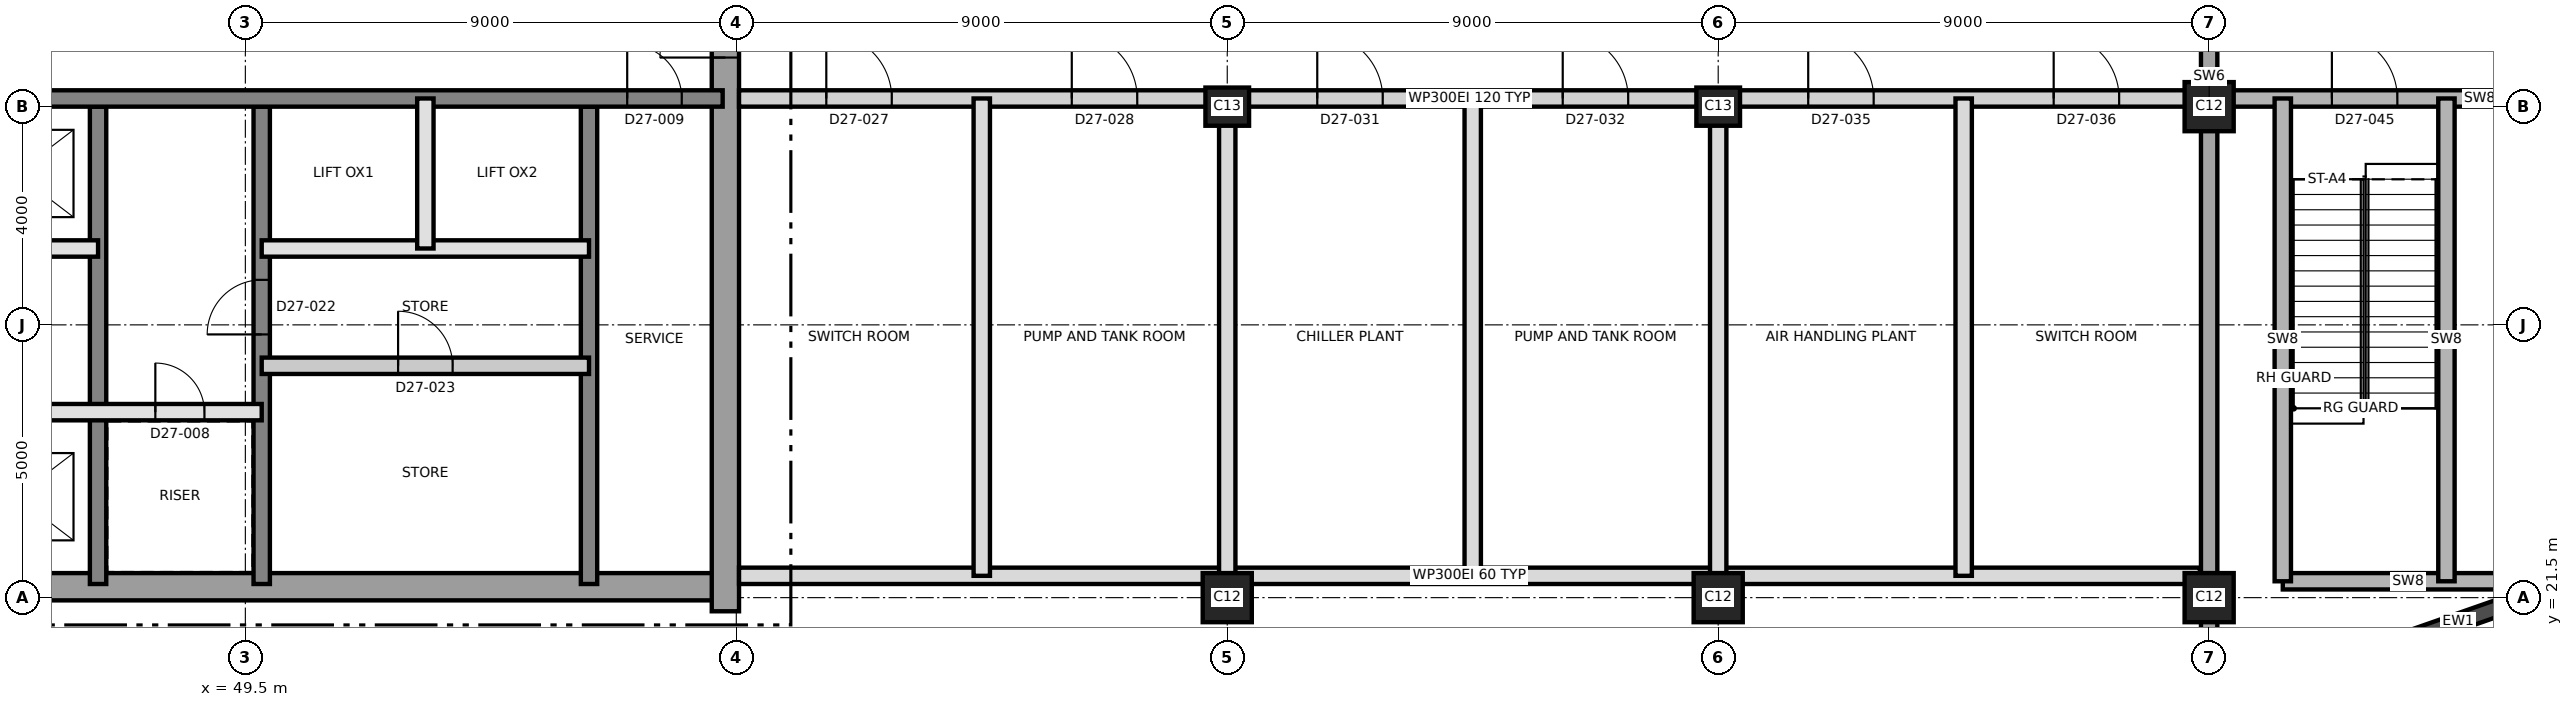
"""IFC4 building model, lengths in metres.
Left out: names, types, materials, properties, quantities, classifications, styles, units other than length and angle.
Written with IfcOpenShell. Run it as: python <this file> out.ifc"""

import sys

from ifc_helpers import new_model, si_unit, direction, frame, frame_2d, origin, origin_2d, place, context, subcontext, project, spatial, rectangle, extrude, element, fill, save


model = new_model("IFC4")
c1 = context("Model", 3, precision=1e-05, world=origin(), true_north=direction((0.0, 1.0)))
c2 = subcontext(c1, "Body", "Model", "MODEL_VIEW")
j1 = project(units=[si_unit("LENGTHUNIT", "METRE"), si_unit("PLANEANGLEUNIT", "RADIAN")], contexts=[c1])
p1 = place(None, origin())
s1 = spatial("IfcSite", under=j1, at=p1, CompositionType="ELEMENT")
p2 = place(p1, origin())
s2 = spatial("IfcBuilding", under=s1, at=p2, CompositionType="ELEMENT")
p3 = place(p2, frame((0.0, 0.0, 243.9)))
s3 = spatial("IfcBuildingStorey", under=s2, at=p3, CompositionType="ELEMENT", Elevation=243.9)
p4 = place(p3, frame((31.25, 21.7, 0.0), z_axis=(0.0, 0.0, 1.0), x_axis=(1.0, 0.0, 0.0)))
e1 = element("IfcWall", 1, at=p4, inside=s3, PredefinedType="SHEAR", context=c2, shape_type="SweptSolid", body=[
    extrude(rectangle(XDim=27.0, YDim=0.5, at=frame_2d((13.5, 0.0))), origin(), (0.0, 0.0, 1.0), 5.5),
])
p5 = place(p3, frame((58.3, 21.25, 0.0), z_axis=(0.0, 0.0, 1.0), x_axis=(0.0, 1.0, 0.0)))
e2 = element("IfcWall", 2, at=p5, inside=s3, PredefinedType="SHEAR", context=c2, shape_type="SweptSolid", body=[
    extrude(rectangle(XDim=18.5, YDim=0.5, at=frame_2d((9.25, 0.0))), origin(), (0.0, 0.0, 1.0), 5.5),
])
p6 = place(p5, frame((10.15, 0.0, 0.0)))
e3 = element("IfcOpeningElement", 3, at=p6, cuts=e2, PredefinedType="OPENING", context=c2, shape_type="SweptSolid", body=[
    extrude(rectangle(XDim=1.2, YDim=2.1, at=frame_2d((0.6, 1.05))), frame((0.0, 0.26, 0.0), z_axis=(0.0, -1.0, 0.0), x_axis=(1.0, 0.0, 0.0)), (0.0, 0.0, 1.0), 0.52),
])
p7 = place(p3, frame((46.8, 21.75, 0.0), z_axis=(0.0, 0.0, 1.0), x_axis=(0.0, 1.0, 0.0)))
e4 = element("IfcWall", 4, at=p7, inside=s3, PredefinedType="SHEAR", context=c2, shape_type="SweptSolid", body=[
    extrude(rectangle(XDim=8.75, YDim=0.3, at=frame_2d((4.375, 0.0))), origin(), (0.0, 0.0, 1.0), 5.5),
])
p8 = place(p3, frame((49.8, 21.75, 0.0), z_axis=(0.0, 0.0, 1.0), x_axis=(0.0, 1.0, 0.0)))
e5 = element("IfcWall", 5, at=p8, inside=s3, PredefinedType="SHEAR", context=c2, shape_type="SweptSolid", body=[
    extrude(rectangle(XDim=8.75, YDim=0.3, at=frame_2d((4.375, 0.0))), origin(), (0.0, 0.0, 1.0), 5.5),
])
p9 = place(p8, frame((4.575, 0.0, 0.0)))
e6 = element("IfcOpeningElement", 6, at=p9, cuts=e5, PredefinedType="OPENING", context=c2, shape_type="SweptSolid", body=[
    extrude(rectangle(XDim=1.0, YDim=2.1, at=frame_2d((0.5, 1.05))), frame((0.0, 0.16, 0.0), z_axis=(0.0, -1.0, 0.0), x_axis=(1.0, 0.0, 0.0)), (0.0, 0.0, 1.0), 0.32),
])
p10 = place(p3, frame((55.8, 21.75, 0.0), z_axis=(0.0, 0.0, 1.0), x_axis=(0.0, 1.0, 0.0)))
e7 = element("IfcWall", 7, at=p10, inside=s3, PredefinedType="SHEAR", context=c2, shape_type="SweptSolid", body=[
    extrude(rectangle(XDim=8.75, YDim=0.3, at=frame_2d((4.375, 0.0))), origin(), (0.0, 0.0, 1.0), 5.5),
])
p11 = place(p3, frame((31.75, 30.65, 0.0), z_axis=(0.0, 0.0, 1.0), x_axis=(1.0, 0.0, 0.0)))
e8 = element("IfcWall", 8, at=p11, inside=s3, PredefinedType="SHEAR", context=c2, shape_type="SweptSolid", body=[
    extrude(rectangle(XDim=26.5, YDim=0.3, at=frame_2d((13.25, 0.0))), origin(), (0.0, 0.0, 1.0), 5.5),
])
p12 = place(p11, frame((24.75, 0.0, 0.0)))
e9 = element("IfcOpeningElement", 9, at=p12, cuts=e8, PredefinedType="OPENING", context=c2, shape_type="SweptSolid", body=[
    extrude(rectangle(XDim=1.0, YDim=2.1, at=frame_2d((0.5, 1.05))), frame((0.0, 0.16, 0.0), z_axis=(0.0, -1.0, 0.0), x_axis=(1.0, 0.0, 0.0)), (0.0, 0.0, 1.0), 0.32),
])
for number, where, z_axis, x_axis in (
    (10, (67.5, 21.5, 0.0), (0.0, 0.0, 1.0), (1.0, 0.0, 0.0)),
    (11, (76.5, 21.5, 0.0), (0.0, 0.0, 1.0), (1.0, 0.0, 0.0)),
    (12, (85.5, 21.5, 0.0), (0.0, 0.0, 1.0), (1.0, 0.0, 0.0)),
):
    element("IfcColumn", number, at=place(p3, frame(where, z_axis=z_axis, x_axis=x_axis)), inside=s3, PredefinedType="COLUMN", context=c2, shape_type="SweptSolid", body=[
        extrude(rectangle(XDim=0.9, YDim=0.9, at=origin_2d()), origin(), (0.0, 0.0, 1.0), 5.5),
    ])
for number, where, z_axis, x_axis in (
    (13, (67.5, 30.5, 0.0), (0.0, 0.0, 1.0), (1.0, 0.0, 0.0)),
    (14, (76.5, 30.5, 0.0), (0.0, 0.0, 1.0), (1.0, 0.0, 0.0)),
):
    element("IfcColumn", number, at=place(p3, frame(where, z_axis=z_axis, x_axis=x_axis)), inside=s3, PredefinedType="COLUMN", context=c2, shape_type="SweptSolid", body=[
        extrude(rectangle(XDim=0.8, YDim=0.7, at=origin_2d()), origin(), (0.0, 0.0, 1.0), 5.5),
    ])
p13 = place(p3, frame((85.5, 30.5, 0.0), z_axis=(0.0, 0.0, 1.0), x_axis=(1.0, 0.0, 0.0)))
e15 = element("IfcColumn", 15, at=p13, inside=s3, PredefinedType="COLUMN", context=c2, shape_type="SweptSolid", body=[
    extrude(rectangle(XDim=0.9, YDim=0.9, at=origin_2d()), origin(), (0.0, 0.0, 1.0), 5.5),
])
p14 = place(p3, frame((85.5, 20.35, 0.0), z_axis=(0.0, 0.0, 1.0), x_axis=(0.0, 1.0, 0.0)))
e16 = element("IfcWall", 16, at=p14, inside=s3, PredefinedType="SHEAR", context=c2, shape_type="SweptSolid", body=[
    extrude(rectangle(XDim=20.3, YDim=0.3, at=frame_2d((10.15, 0.0))), origin(), (0.0, 0.0, 1.0), 5.5),
])
p15 = place(p14, frame((11.35, 0.0, 0.0)))
e17 = element("IfcOpeningElement", 17, at=p15, cuts=e16, PredefinedType="OPENING", context=c2, shape_type="SweptSolid", body=[
    extrude(rectangle(XDim=1.4, YDim=2.1, at=frame_2d((0.7, 1.05))), frame((0.0, 0.16, 0.0), z_axis=(0.0, -1.0, 0.0), x_axis=(1.0, 0.0, 0.0)), (0.0, 0.0, 1.0), 0.32),
])
p16 = place(p3, frame((87.499, 20.158, 0.0), z_axis=(0.0, 0.0, 1.0), x_axis=(0.943879346284, 0.330290447423, 0.0)))
e18 = element("IfcWall", 18, at=p16, inside=s3, PredefinedType="SOLIDWALL", context=c2, shape_type="SweptSolid", body=[
    extrude(rectangle(XDim=5.439, YDim=0.3, at=frame_2d((2.72, 0.0))), origin(), (0.0, 0.0, 1.0), 5.2),
])
p17 = place(p3, frame((37.8, 24.9, 0.0), z_axis=(0.0, 0.0, 1.0), x_axis=(1.0, 0.0, 0.0)))
e19 = element("IfcWall", 19, at=p17, inside=s3, PredefinedType="SOLIDWALL", context=c2, shape_type="SweptSolid", body=[
    extrude(rectangle(XDim=12.0, YDim=0.3, at=frame_2d((6.0, 0.0))), origin(), (0.0, 0.0, 1.0), 5.2),
])
p18 = place(p17, frame((1.05, 0.0, 0.0)))
e20 = element("IfcOpeningElement", 20, at=p18, cuts=e19, PredefinedType="OPENING", context=c2, shape_type="SweptSolid", body=[
    extrude(rectangle(XDim=0.9, YDim=2.1, at=frame_2d((0.45, 1.05))), frame((0.0, 0.16, 0.0), z_axis=(0.0, -1.0, 0.0), x_axis=(1.0, 0.0, 0.0)), (0.0, 0.0, 1.0), 0.32),
])
p19 = place(p17, frame((10.05, 0.0, 0.0)))
e21 = element("IfcOpeningElement", 21, at=p19, cuts=e19, PredefinedType="OPENING", context=c2, shape_type="SweptSolid", body=[
    extrude(rectangle(XDim=0.9, YDim=2.1, at=frame_2d((0.45, 1.05))), frame((0.0, 0.16, 0.0), z_axis=(0.0, -1.0, 0.0), x_axis=(1.0, 0.0, 0.0)), (0.0, 0.0, 1.0), 0.32),
])
p20 = place(p17, frame((3.95, 0.0, 0.0)))
e22 = element("IfcOpeningElement", 22, at=p20, cuts=e19, PredefinedType="OPENING", context=c2, shape_type="SweptSolid", body=[
    extrude(rectangle(XDim=1.1, YDim=2.4, at=frame_2d((0.55, 1.2))), frame((0.0, 0.16, 0.0), z_axis=(0.0, -1.0, 0.0), x_axis=(1.0, 0.0, 0.0)), (0.0, 0.0, 1.0), 0.32),
])
p21 = place(p17, frame((6.95, 0.0, 0.0)))
e23 = element("IfcOpeningElement", 23, at=p21, cuts=e19, PredefinedType="OPENING", context=c2, shape_type="SweptSolid", body=[
    extrude(rectangle(XDim=1.1, YDim=2.4, at=frame_2d((0.55, 1.2))), frame((0.0, 0.16, 0.0), z_axis=(0.0, -1.0, 0.0), x_axis=(1.0, 0.0, 0.0)), (0.0, 0.0, 1.0), 0.32),
])
p22 = place(p3, frame((49.8, 25.75, 0.0), z_axis=(0.0, 0.0, 1.0), x_axis=(1.0, 0.0, 0.0)))
e24 = element("IfcWall", 24, at=p22, inside=s3, PredefinedType="PARTITIONING", context=c2, shape_type="SweptSolid", body=[
    extrude(rectangle(XDim=6.0, YDim=0.3, at=frame_2d((3.0, 0.0))), origin(), (0.0, 0.0, 1.0), 5.2),
])
p23 = place(p22, frame((2.5, 0.0, 0.0)))
e25 = element("IfcOpeningElement", 25, at=p23, cuts=e24, PredefinedType="OPENING", context=c2, shape_type="SweptSolid", body=[
    extrude(rectangle(XDim=1.0, YDim=2.1, at=frame_2d((0.5, 1.05))), frame((0.0, 0.16, 0.0), z_axis=(0.0, -1.0, 0.0), x_axis=(1.0, 0.0, 0.0)), (0.0, 0.0, 1.0), 0.32),
])
p24 = place(p3, frame((40.8, 27.9, 0.0), z_axis=(0.0, 0.0, 1.0), x_axis=(1.0, 0.0, 0.0)))
e26 = element("IfcWall", 26, at=p24, inside=s3, PredefinedType="SOLIDWALL", context=c2, shape_type="SweptSolid", body=[
    extrude(rectangle(XDim=6.0, YDim=0.3, at=frame_2d((3.0, 0.0))), origin(), (0.0, 0.0, 1.0), 5.2),
])
p25 = place(p24, frame((0.95, 0.0, 0.0)))
e27 = element("IfcOpeningElement", 27, at=p25, cuts=e26, PredefinedType="OPENING", context=c2, shape_type="SweptSolid", body=[
    extrude(rectangle(XDim=1.1, YDim=2.4, at=frame_2d((0.55, 1.2))), frame((0.0, 0.16, 0.0), z_axis=(0.0, -1.0, 0.0), x_axis=(1.0, 0.0, 0.0)), (0.0, 0.0, 1.0), 0.32),
])
p26 = place(p24, frame((3.95, 0.0, 0.0)))
e28 = element("IfcOpeningElement", 28, at=p26, cuts=e26, PredefinedType="OPENING", context=c2, shape_type="SweptSolid", body=[
    extrude(rectangle(XDim=1.1, YDim=2.4, at=frame_2d((0.55, 1.2))), frame((0.0, 0.16, 0.0), z_axis=(0.0, -1.0, 0.0), x_axis=(1.0, 0.0, 0.0)), (0.0, 0.0, 1.0), 0.32),
])
p27 = place(p3, frame((49.8, 27.9, 0.0), z_axis=(0.0, 0.0, 1.0), x_axis=(1.0, 0.0, 0.0)))
e29 = element("IfcWall", 29, at=p27, inside=s3, PredefinedType="SOLIDWALL", context=c2, shape_type="SweptSolid", body=[
    extrude(rectangle(XDim=6.0, YDim=0.3, at=frame_2d((3.0, 0.0))), origin(), (0.0, 0.0, 1.0), 5.2),
])
p28 = place(p3, frame((52.8, 27.9, 0.0), z_axis=(0.0, 0.0, 1.0), x_axis=(0.0, 1.0, 0.0)))
e30 = element("IfcWall", 30, at=p28, inside=s3, PredefinedType="SOLIDWALL", context=c2, shape_type="SweptSolid", body=[
    extrude(rectangle(XDim=2.75, YDim=0.3, at=frame_2d((1.375, 0.0))), origin(), (0.0, 0.0, 1.0), 5.2),
])
p29 = place(p3, frame((86.85, 21.8, 0.0), z_axis=(0.0, 0.0, 1.0), x_axis=(1.0, 0.0, 0.0)))
e31 = element("IfcWall", 31, at=p29, inside=s3, PredefinedType="SHEAR", context=c2, shape_type="SweptSolid", body=[
    extrude(rectangle(XDim=4.596, YDim=0.3, at=frame_2d((2.298, 0.0))), origin(), (0.0, 0.0, 1.0), 5.2),
])
p30 = place(p3, frame((58.55, 21.9, 0.0), z_axis=(0.0, 0.0, 1.0), x_axis=(1.0, 0.0, 0.0)))
e32 = element("IfcWall", 32, at=p30, inside=s3, PredefinedType="PARTITIONING", context=c2, shape_type="SweptSolid", body=[
    extrude(rectangle(XDim=26.78, YDim=0.3, at=frame_2d((13.39, 0.0))), origin(), (0.0, 0.0, 1.0), 5.2),
])
p31 = place(p3, frame((58.55, 30.65, 0.0), z_axis=(0.0, 0.0, 1.0), x_axis=(1.0, 0.0, 0.0)))
e33 = element("IfcWall", 33, at=p31, inside=s3, PredefinedType="PARTITIONING", context=c2, shape_type="SweptSolid", body=[
    extrude(rectangle(XDim=26.78, YDim=0.3, at=frame_2d((13.39, 0.0))), origin(), (0.0, 0.0, 1.0), 5.2),
])
p32 = place(p31, frame((1.6, 0.0, 0.0)))
e34 = element("IfcOpeningElement", 34, at=p32, cuts=e33, PredefinedType="OPENING", context=c2, shape_type="SweptSolid", body=[
    extrude(rectangle(XDim=1.2, YDim=2.1, at=frame_2d((0.6, 1.05))), frame((0.0, 0.16, 0.0), z_axis=(0.0, -1.0, 0.0), x_axis=(1.0, 0.0, 0.0)), (0.0, 0.0, 1.0), 0.32),
])
p33 = place(p31, frame((6.1, 0.0, 0.0)))
e35 = element("IfcOpeningElement", 35, at=p33, cuts=e33, PredefinedType="OPENING", context=c2, shape_type="SweptSolid", body=[
    extrude(rectangle(XDim=1.2, YDim=2.1, at=frame_2d((0.6, 1.05))), frame((0.0, 0.16, 0.0), z_axis=(0.0, -1.0, 0.0), x_axis=(1.0, 0.0, 0.0)), (0.0, 0.0, 1.0), 0.32),
])
p34 = place(p31, frame((10.6, 0.0, 0.0)))
e36 = element("IfcOpeningElement", 36, at=p34, cuts=e33, PredefinedType="OPENING", context=c2, shape_type="SweptSolid", body=[
    extrude(rectangle(XDim=1.2, YDim=2.1, at=frame_2d((0.6, 1.05))), frame((0.0, 0.16, 0.0), z_axis=(0.0, -1.0, 0.0), x_axis=(1.0, 0.0, 0.0)), (0.0, 0.0, 1.0), 0.32),
])
p35 = place(p31, frame((15.1, 0.0, 0.0)))
e37 = element("IfcOpeningElement", 37, at=p35, cuts=e33, PredefinedType="OPENING", context=c2, shape_type="SweptSolid", body=[
    extrude(rectangle(XDim=1.2, YDim=2.1, at=frame_2d((0.6, 1.05))), frame((0.0, 0.16, 0.0), z_axis=(0.0, -1.0, 0.0), x_axis=(1.0, 0.0, 0.0)), (0.0, 0.0, 1.0), 0.32),
])
p36 = place(p31, frame((19.6, 0.0, 0.0)))
e38 = element("IfcOpeningElement", 38, at=p36, cuts=e33, PredefinedType="OPENING", context=c2, shape_type="SweptSolid", body=[
    extrude(rectangle(XDim=1.2, YDim=2.1, at=frame_2d((0.6, 1.05))), frame((0.0, 0.16, 0.0), z_axis=(0.0, -1.0, 0.0), x_axis=(1.0, 0.0, 0.0)), (0.0, 0.0, 1.0), 0.32),
])
p37 = place(p31, frame((24.1, 0.0, 0.0)))
e39 = element("IfcOpeningElement", 39, at=p37, cuts=e33, PredefinedType="OPENING", context=c2, shape_type="SweptSolid", body=[
    extrude(rectangle(XDim=1.2, YDim=2.1, at=frame_2d((0.6, 1.05))), frame((0.0, 0.16, 0.0), z_axis=(0.0, -1.0, 0.0), x_axis=(1.0, 0.0, 0.0)), (0.0, 0.0, 1.0), 0.32),
])
p38 = place(p3, frame((85.67, 30.65, 0.0), z_axis=(0.0, 0.0, 1.0), x_axis=(1.0, 0.0, 0.0)))
e40 = element("IfcWall", 40, at=p38, inside=s3, PredefinedType="SHEAR", context=c2, shape_type="SweptSolid", body=[
    extrude(rectangle(XDim=9.58, YDim=0.3, at=frame_2d((4.79, 0.0))), origin(), (0.0, 0.0, 1.0), 5.2),
])
p39 = place(p38, frame((2.08, 0.0, 0.0)))
e41 = element("IfcOpeningElement", 41, at=p39, cuts=e40, PredefinedType="OPENING", context=c2, shape_type="SweptSolid", body=[
    extrude(rectangle(XDim=1.2, YDim=2.1, at=frame_2d((0.6, 1.05))), frame((0.0, 0.16, 0.0), z_axis=(0.0, -1.0, 0.0), x_axis=(1.0, 0.0, 0.0)), (0.0, 0.0, 1.0), 0.32),
])
p40 = place(p38, frame((5.63, 0.0, 0.0)))
e42 = element("IfcOpeningElement", 42, at=p40, cuts=e40, PredefinedType="OPENING", context=c2, shape_type="SweptSolid", body=[
    extrude(rectangle(XDim=1.0, YDim=2.1, at=frame_2d((0.5, 1.05))), frame((0.0, 0.16, 0.0), z_axis=(0.0, -1.0, 0.0), x_axis=(1.0, 0.0, 0.0)), (0.0, 0.0, 1.0), 0.32),
])
for number, where, z_axis, x_axis in (
    (43, (63.0, 21.9, 0.0), (0.0, 0.0, 1.0), (0.0, 1.0, 0.0)),
    (44, (67.5, 21.9, 0.0), (0.0, 0.0, 1.0), (0.0, 1.0, 0.0)),
    (45, (72.0, 21.9, 0.0), (0.0, 0.0, 1.0), (0.0, 1.0, 0.0)),
    (46, (76.5, 21.9, 0.0), (0.0, 0.0, 1.0), (0.0, 1.0, 0.0)),
    (47, (81.0, 21.9, 0.0), (0.0, 0.0, 1.0), (0.0, 1.0, 0.0)),
):
    element("IfcWall", number, at=place(p3, frame(where, z_axis=z_axis, x_axis=x_axis)), inside=s3, PredefinedType="PARTITIONING", context=c2, shape_type="SweptSolid", body=[
        extrude(rectangle(XDim=8.75, YDim=0.3, at=frame_2d((4.375, 0.0))), origin(), (0.0, 0.0, 1.0), 5.2),
    ])
for number, where, z_axis, x_axis in (
    (48, (86.85, 21.8, 0.0), (0.0, 0.0, 1.0), (0.0, 1.0, 0.0)),
    (49, (89.85, 21.8, 0.0), (0.0, 0.0, 1.0), (0.0, 1.0, 0.0)),
):
    element("IfcWall", number, at=place(p3, frame(where, z_axis=z_axis, x_axis=x_axis)), inside=s3, PredefinedType="SHEAR", context=c2, shape_type="SweptSolid", body=[
        extrude(rectangle(XDim=8.85, YDim=0.3, at=frame_2d((4.425, 0.0))), origin(), (0.0, 0.0, 1.0), 5.2),
    ])
p41 = place(p19, origin())
e50 = element("IfcDoor", 50, at=p41, inside=s3, OperationType="SINGLE_SWING_RIGHT", PredefinedType="DOOR", context=c2, shape_type="SweptSolid", body=[
    extrude(rectangle(XDim=0.9, YDim=2.1, at=frame_2d((0.45, 1.05))), frame((0.0, 0.025, 0.0), z_axis=(0.0, -1.0, 0.0), x_axis=(1.0, 0.0, 0.0)), (0.0, 0.0, 1.0), 0.05),
])
fill(e21, e50)
p42 = place(p12, origin())
e51 = element("IfcDoor", 51, at=p42, inside=s3, OperationType="SINGLE_SWING_LEFT", PredefinedType="DOOR", context=c2, shape_type="SweptSolid", body=[
    extrude(rectangle(XDim=1.0, YDim=2.1, at=frame_2d((0.5, 1.05))), frame((0.0, 0.025, 0.0), z_axis=(0.0, -1.0, 0.0), x_axis=(1.0, 0.0, 0.0)), (0.0, 0.0, 1.0), 0.05),
])
fill(e9, e51)
p43 = place(p6, origin())
e52 = element("IfcDoor", 52, at=p43, inside=s3, OperationType="SINGLE_SWING_LEFT", PredefinedType="DOOR", context=c2, shape_type="SweptSolid", body=[
    extrude(rectangle(XDim=1.2, YDim=2.1, at=frame_2d((0.6, 1.05))), frame((0.0, 0.025, 0.0), z_axis=(0.0, -1.0, 0.0), x_axis=(1.0, 0.0, 0.0)), (0.0, 0.0, 1.0), 0.05),
])
fill(e3, e52)
p44 = place(p9, origin())
e53 = element("IfcDoor", 53, at=p44, inside=s3, OperationType="SINGLE_SWING_LEFT", PredefinedType="DOOR", context=c2, shape_type="SweptSolid", body=[
    extrude(rectangle(XDim=1.0, YDim=2.1, at=frame_2d((0.5, 1.05))), frame((0.0, 0.025, 0.0), z_axis=(0.0, -1.0, 0.0), x_axis=(1.0, 0.0, 0.0)), (0.0, 0.0, 1.0), 0.05),
])
fill(e6, e53)
p45 = place(p23, origin())
e54 = element("IfcDoor", 54, at=p45, inside=s3, OperationType="SINGLE_SWING_RIGHT", PredefinedType="DOOR", context=c2, shape_type="SweptSolid", body=[
    extrude(rectangle(XDim=1.0, YDim=2.1, at=frame_2d((0.5, 1.05))), frame((0.0, 0.025, 0.0), z_axis=(0.0, -1.0, 0.0), x_axis=(1.0, 0.0, 0.0)), (0.0, 0.0, 1.0), 0.05),
])
fill(e25, e54)
p46 = place(p32, origin())
e55 = element("IfcDoor", 55, at=p46, inside=s3, OperationType="SINGLE_SWING_RIGHT", PredefinedType="DOOR", context=c2, shape_type="SweptSolid", body=[
    extrude(rectangle(XDim=1.2, YDim=2.1, at=frame_2d((0.6, 1.05))), frame((0.0, 0.025, 0.0), z_axis=(0.0, -1.0, 0.0), x_axis=(1.0, 0.0, 0.0)), (0.0, 0.0, 1.0), 0.05),
])
fill(e34, e55)
p47 = place(p33, origin())
e56 = element("IfcDoor", 56, at=p47, inside=s3, OperationType="SINGLE_SWING_LEFT", PredefinedType="DOOR", context=c2, shape_type="SweptSolid", body=[
    extrude(rectangle(XDim=1.2, YDim=2.1, at=frame_2d((0.6, 1.05))), frame((0.0, 0.025, 0.0), z_axis=(0.0, -1.0, 0.0), x_axis=(1.0, 0.0, 0.0)), (0.0, 0.0, 1.0), 0.05),
])
fill(e35, e56)
p48 = place(p34, origin())
e57 = element("IfcDoor", 57, at=p48, inside=s3, OperationType="SINGLE_SWING_LEFT", PredefinedType="DOOR", context=c2, shape_type="SweptSolid", body=[
    extrude(rectangle(XDim=1.2, YDim=2.1, at=frame_2d((0.6, 1.05))), frame((0.0, 0.025, 0.0), z_axis=(0.0, -1.0, 0.0), x_axis=(1.0, 0.0, 0.0)), (0.0, 0.0, 1.0), 0.05),
])
fill(e36, e57)
p49 = place(p35, origin())
e58 = element("IfcDoor", 58, at=p49, inside=s3, OperationType="SINGLE_SWING_LEFT", PredefinedType="DOOR", context=c2, shape_type="SweptSolid", body=[
    extrude(rectangle(XDim=1.2, YDim=2.1, at=frame_2d((0.6, 1.05))), frame((0.0, 0.025, 0.0), z_axis=(0.0, -1.0, 0.0), x_axis=(1.0, 0.0, 0.0)), (0.0, 0.0, 1.0), 0.05),
])
fill(e37, e58)
p50 = place(p36, origin())
e59 = element("IfcDoor", 59, at=p50, inside=s3, OperationType="SINGLE_SWING_LEFT", PredefinedType="DOOR", context=c2, shape_type="SweptSolid", body=[
    extrude(rectangle(XDim=1.2, YDim=2.1, at=frame_2d((0.6, 1.05))), frame((0.0, 0.025, 0.0), z_axis=(0.0, -1.0, 0.0), x_axis=(1.0, 0.0, 0.0)), (0.0, 0.0, 1.0), 0.05),
])
fill(e38, e59)
p51 = place(p37, origin())
e60 = element("IfcDoor", 60, at=p51, inside=s3, OperationType="SINGLE_SWING_RIGHT", PredefinedType="DOOR", context=c2, shape_type="SweptSolid", body=[
    extrude(rectangle(XDim=1.2, YDim=2.1, at=frame_2d((0.6, 1.05))), frame((0.0, 0.025, 0.0), z_axis=(0.0, -1.0, 0.0), x_axis=(1.0, 0.0, 0.0)), (0.0, 0.0, 1.0), 0.05),
])
fill(e39, e60)
p52 = place(p39, origin())
e61 = element("IfcDoor", 61, at=p52, inside=s3, OperationType="SINGLE_SWING_LEFT", PredefinedType="DOOR", context=c2, shape_type="SweptSolid", body=[
    extrude(rectangle(XDim=1.2, YDim=2.1, at=frame_2d((0.6, 1.05))), frame((0.0, 0.025, 0.0), z_axis=(0.0, -1.0, 0.0), x_axis=(1.0, 0.0, 0.0)), (0.0, 0.0, 1.0), 0.05),
])
fill(e41, e61)
save(model, sys.argv[1])
